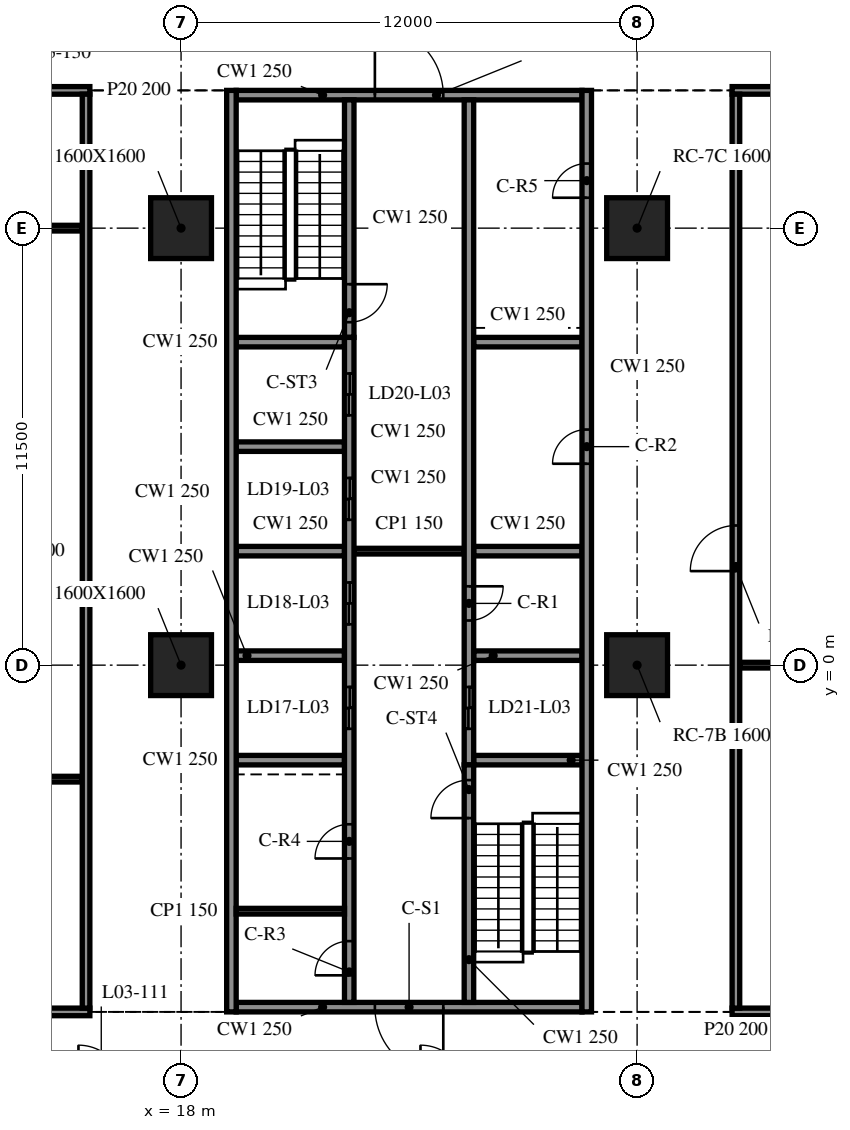
"""IFC4 building model, lengths in metres.
Left out: names, types, materials, properties, quantities, classifications, styles, units other than length and angle.
Written with IfcOpenShell. Run it as: python <this file> out.ifc"""

import sys

from ifc_helpers import new_model, si_unit, direction, frame, frame_2d, origin, origin_2d, place, context, subcontext, project, spatial, rectangle, extrude, element, fill, save


model = new_model("IFC4")
c1 = context("Model", 3, precision=1e-05, world=origin(), true_north=direction((0.0, 1.0)))
c2 = subcontext(c1, "Body", "Model", "MODEL_VIEW")
j1 = project(units=[si_unit("LENGTHUNIT", "METRE"), si_unit("PLANEANGLEUNIT", "RADIAN")], contexts=[c1])
p1 = place(None, origin())
s1 = spatial("IfcSite", under=j1, at=p1, CompositionType="ELEMENT")
p2 = place(p1, origin())
s2 = spatial("IfcBuilding", under=s1, at=p2, CompositionType="ELEMENT")
p3 = place(p2, frame((0.0, 0.0, 15.8)))
s3 = spatial("IfcBuildingStorey", under=s2, at=p3, CompositionType="ELEMENT", Elevation=15.8)
for number, where, z_axis, x_axis in (
    (1, (18.0, 0.0, -0.34), (0.0, 0.0, 1.0), (1.0, 0.0, 0.0)),
    (2, (18.0, 11.5, -0.34), (0.0, 0.0, 1.0), (1.0, 0.0, 0.0)),
    (3, (30.0, 0.0, -0.34), (0.0, 0.0, 1.0), (1.0, 0.0, 0.0)),
    (4, (30.0, 11.5, -0.34), (0.0, 0.0, 1.0), (1.0, 0.0, 0.0)),
):
    element("IfcColumn", number, at=place(p3, frame(where, z_axis=z_axis, x_axis=x_axis)), inside=s3, PredefinedType="COLUMN", context=c2, shape_type="SweptSolid", body=[
        extrude(rectangle(XDim=1.6, YDim=1.6, at=origin_2d()), origin(), (0.0, 0.0, 1.0), 4.3),
    ])
p4 = place(p3, frame((19.325, 15.125, 0.0), z_axis=(0.0, 0.0, 1.0), x_axis=(0.0, -1.0, 0.0)))
e5 = element("IfcWall", 5, at=p4, inside=s3, PredefinedType="SOLIDWALL", context=c2, shape_type="SweptSolid", body=[
    extrude(rectangle(XDim=24.25, YDim=0.25, at=frame_2d((12.125, 0.0))), origin(), (0.0, 0.0, 1.0), 3.96),
])
p5 = place(p3, frame((28.675, -9.125, 0.0), z_axis=(0.0, 0.0, 1.0), x_axis=(0.0, 1.0, 0.0)))
e6 = element("IfcWall", 6, at=p5, inside=s3, PredefinedType="SOLIDWALL", context=c2, shape_type="SweptSolid", body=[
    extrude(rectangle(XDim=24.25, YDim=0.25, at=frame_2d((12.125, 0.0))), origin(), (0.0, 0.0, 1.0), 3.96),
])
p6 = place(p5, frame((14.425, 0.0, 0.0)))
e7 = element("IfcOpeningElement", 7, at=p6, cuts=e6, PredefinedType="OPENING", context=c2, shape_type="SweptSolid", body=[
    extrude(rectangle(XDim=0.9, YDim=2.1, at=frame_2d((0.45, 1.05))), frame((0.0, 0.135, 0.0), z_axis=(0.0, -1.0, 0.0), x_axis=(1.0, 0.0, 0.0)), (0.0, 0.0, 1.0), 0.27),
])
p7 = place(p5, frame((21.425, 0.0, 0.0)))
e8 = element("IfcOpeningElement", 8, at=p7, cuts=e6, PredefinedType="OPENING", context=c2, shape_type="SweptSolid", body=[
    extrude(rectangle(XDim=0.9, YDim=2.1, at=frame_2d((0.45, 1.05))), frame((0.0, 0.135, 0.0), z_axis=(0.0, -1.0, 0.0), x_axis=(1.0, 0.0, 0.0)), (0.0, 0.0, 1.0), 0.27),
])
p8 = place(p3, frame((28.55, -9.0, 0.0), z_axis=(0.0, 0.0, 1.0), x_axis=(-1.0, 0.0, 0.0)))
e9 = element("IfcWall", 9, at=p8, inside=s3, PredefinedType="SOLIDWALL", context=c2, shape_type="SweptSolid", body=[
    extrude(rectangle(XDim=9.1, YDim=0.25, at=frame_2d((4.55, 0.0))), origin(), (0.0, 0.0, 1.0), 3.96),
])
p9 = place(p8, frame((3.65, 0.0, 0.0)))
e10 = element("IfcOpeningElement", 10, at=p9, cuts=e9, PredefinedType="OPENING", context=c2, shape_type="SweptSolid", body=[
    extrude(rectangle(XDim=1.8, YDim=2.1, at=frame_2d((0.9, 1.05))), frame((0.0, 0.135, 0.0), z_axis=(0.0, -1.0, 0.0), x_axis=(1.0, 0.0, 0.0)), (0.0, 0.0, 1.0), 0.27),
])
p10 = place(p3, frame((19.45, 15.0, 0.0), z_axis=(0.0, 0.0, 1.0), x_axis=(1.0, 0.0, 0.0)))
e11 = element("IfcWall", 11, at=p10, inside=s3, PredefinedType="SOLIDWALL", context=c2, shape_type="SweptSolid", body=[
    extrude(rectangle(XDim=9.1, YDim=0.25, at=frame_2d((4.55, 0.0))), origin(), (0.0, 0.0, 1.0), 3.96),
])
p11 = place(p10, frame((3.65, 0.0, 0.0)))
e12 = element("IfcOpeningElement", 12, at=p11, cuts=e11, PredefinedType="OPENING", context=c2, shape_type="SweptSolid", body=[
    extrude(rectangle(XDim=1.8, YDim=2.1, at=frame_2d((0.9, 1.05))), frame((0.0, 0.135, 0.0), z_axis=(0.0, -1.0, 0.0), x_axis=(1.0, 0.0, 0.0)), (0.0, 0.0, 1.0), 0.27),
])
p12 = place(p3, frame((22.425, -8.875, 0.0), z_axis=(0.0, 0.0, 1.0), x_axis=(0.0, 1.0, 0.0)))
e13 = element("IfcWall", 13, at=p12, inside=s3, PredefinedType="SOLIDWALL", context=c2, shape_type="SweptSolid", body=[
    extrude(rectangle(XDim=17.5, YDim=0.25, at=frame_2d((8.75, 0.0))), origin(), (0.0, 0.0, 1.0), 3.96),
])
p13 = place(p12, frame((7.2, 0.0, 0.0)))
e14 = element("IfcOpeningElement", 14, at=p13, cuts=e13, PredefinedType="OPENING", context=c2, shape_type="SweptSolid", body=[
    extrude(rectangle(XDim=1.1, YDim=2.1, at=frame_2d((0.55, 1.05))), frame((0.0, 0.135, 0.0), z_axis=(0.0, -1.0, 0.0), x_axis=(1.0, 0.0, 0.0)), (0.0, 0.0, 1.0), 0.27),
])
p14 = place(p12, frame((9.95, 0.0, 0.0)))
e15 = element("IfcOpeningElement", 15, at=p14, cuts=e13, PredefinedType="OPENING", context=c2, shape_type="SweptSolid", body=[
    extrude(rectangle(XDim=1.1, YDim=2.1, at=frame_2d((0.55, 1.05))), frame((0.0, 0.135, 0.0), z_axis=(0.0, -1.0, 0.0), x_axis=(1.0, 0.0, 0.0)), (0.0, 0.0, 1.0), 0.27),
])
p15 = place(p12, frame((12.7, 0.0, 0.0)))
e16 = element("IfcOpeningElement", 16, at=p15, cuts=e13, PredefinedType="OPENING", context=c2, shape_type="SweptSolid", body=[
    extrude(rectangle(XDim=1.1, YDim=2.1, at=frame_2d((0.55, 1.05))), frame((0.0, 0.135, 0.0), z_axis=(0.0, -1.0, 0.0), x_axis=(1.0, 0.0, 0.0)), (0.0, 0.0, 1.0), 0.27),
])
p16 = place(p12, frame((15.45, 0.0, 0.0)))
e17 = element("IfcOpeningElement", 17, at=p16, cuts=e13, PredefinedType="OPENING", context=c2, shape_type="SweptSolid", body=[
    extrude(rectangle(XDim=1.1, YDim=2.1, at=frame_2d((0.55, 1.05))), frame((0.0, 0.135, 0.0), z_axis=(0.0, -1.0, 0.0), x_axis=(1.0, 0.0, 0.0)), (0.0, 0.0, 1.0), 0.27),
])
p17 = place(p12, frame((0.712, 0.0, 0.0)))
e18 = element("IfcOpeningElement", 18, at=p17, cuts=e13, PredefinedType="OPENING", context=c2, shape_type="SweptSolid", body=[
    extrude(rectangle(XDim=0.9, YDim=2.1, at=frame_2d((0.45, 1.05))), frame((0.0, 0.135, 0.0), z_axis=(0.0, -1.0, 0.0), x_axis=(1.0, 0.0, 0.0)), (0.0, 0.0, 1.0), 0.27),
])
p18 = place(p12, frame((3.788, 0.0, 0.0)))
e19 = element("IfcOpeningElement", 19, at=p18, cuts=e13, PredefinedType="OPENING", context=c2, shape_type="SweptSolid", body=[
    extrude(rectangle(XDim=0.9, YDim=2.1, at=frame_2d((0.45, 1.05))), frame((0.0, 0.135, 0.0), z_axis=(0.0, -1.0, 0.0), x_axis=(1.0, 0.0, 0.0)), (0.0, 0.0, 1.0), 0.27),
])
p19 = place(p3, frame((22.425, 14.875, 0.0), z_axis=(0.0, 0.0, 1.0), x_axis=(0.0, -1.0, 0.0)))
e20 = element("IfcWall", 20, at=p19, inside=s3, PredefinedType="SOLIDWALL", context=c2, shape_type="SweptSolid", body=[
    extrude(rectangle(XDim=6.25, YDim=0.25, at=frame_2d((3.125, 0.0))), origin(), (0.0, 0.0, 1.0), 3.96),
])
p20 = place(p19, frame((4.85, 0.0, 0.0)))
e21 = element("IfcOpeningElement", 21, at=p20, cuts=e20, PredefinedType="OPENING", context=c2, shape_type="SweptSolid", body=[
    extrude(rectangle(XDim=1.0, YDim=2.1, at=frame_2d((0.5, 1.05))), frame((0.0, 0.135, 0.0), z_axis=(0.0, -1.0, 0.0), x_axis=(1.0, 0.0, 0.0)), (0.0, 0.0, 1.0), 0.27),
])
p21 = place(p3, frame((25.575, -8.875, 0.0), z_axis=(0.0, 0.0, 1.0), x_axis=(0.0, 1.0, 0.0)))
e22 = element("IfcWall", 22, at=p21, inside=s3, PredefinedType="SOLIDWALL", context=c2, shape_type="SweptSolid", body=[
    extrude(rectangle(XDim=6.25, YDim=0.25, at=frame_2d((3.125, 0.0))), origin(), (0.0, 0.0, 1.0), 3.96),
])
p22 = place(p21, frame((4.85, 0.0, 0.0)))
e23 = element("IfcOpeningElement", 23, at=p22, cuts=e22, PredefinedType="OPENING", context=c2, shape_type="SweptSolid", body=[
    extrude(rectangle(XDim=1.0, YDim=2.1, at=frame_2d((0.5, 1.05))), frame((0.0, 0.135, 0.0), z_axis=(0.0, -1.0, 0.0), x_axis=(1.0, 0.0, 0.0)), (0.0, 0.0, 1.0), 0.27),
])
p23 = place(p3, frame((25.575, 14.875, 0.0), z_axis=(0.0, 0.0, 1.0), x_axis=(0.0, -1.0, 0.0)))
e24 = element("IfcWall", 24, at=p23, inside=s3, PredefinedType="SOLIDWALL", context=c2, shape_type="SweptSolid", body=[
    extrude(rectangle(XDim=17.5, YDim=0.25, at=frame_2d((8.75, 0.0))), origin(), (0.0, 0.0, 1.0), 3.96),
])
p24 = place(p23, frame((15.45, 0.0, 0.0)))
e25 = element("IfcOpeningElement", 25, at=p24, cuts=e24, PredefinedType="OPENING", context=c2, shape_type="SweptSolid", body=[
    extrude(rectangle(XDim=1.1, YDim=2.1, at=frame_2d((0.55, 1.05))), frame((0.0, 0.135, 0.0), z_axis=(0.0, -1.0, 0.0), x_axis=(1.0, 0.0, 0.0)), (0.0, 0.0, 1.0), 0.27),
])
p25 = place(p23, frame((12.8, 0.0, 0.0)))
e26 = element("IfcOpeningElement", 26, at=p25, cuts=e24, PredefinedType="OPENING", context=c2, shape_type="SweptSolid", body=[
    extrude(rectangle(XDim=0.9, YDim=2.1, at=frame_2d((0.45, 1.05))), frame((0.0, 0.135, 0.0), z_axis=(0.0, -1.0, 0.0), x_axis=(1.0, 0.0, 0.0)), (0.0, 0.0, 1.0), 0.27),
])
for number, where, z_axis, x_axis in (
    (27, (19.45, -2.5, 0.0), (0.0, 0.0, 1.0), (1.0, 0.0, 0.0)),
    (28, (19.45, 0.25, 0.0), (0.0, 0.0, 1.0), (1.0, 0.0, 0.0)),
    (29, (19.45, 3.0, 0.0), (0.0, 0.0, 1.0), (1.0, 0.0, 0.0)),
    (30, (19.45, 5.75, 0.0), (0.0, 0.0, 1.0), (1.0, 0.0, 0.0)),
    (31, (19.45, 8.5, 0.0), (0.0, 0.0, 1.0), (1.0, 0.0, 0.0)),
    (32, (25.7, -2.5, 0.0), (0.0, 0.0, 1.0), (1.0, 0.0, 0.0)),
    (33, (25.7, 0.25, 0.0), (0.0, 0.0, 1.0), (1.0, 0.0, 0.0)),
    (34, (25.7, 3.0, 0.0), (0.0, 0.0, 1.0), (1.0, 0.0, 0.0)),
    (35, (25.7, 8.5, 0.0), (0.0, 0.0, 1.0), (1.0, 0.0, 0.0)),
):
    element("IfcWall", number, at=place(p3, frame(where, z_axis=z_axis, x_axis=x_axis)), inside=s3, PredefinedType="SOLIDWALL", context=c2, shape_type="SweptSolid", body=[
        extrude(rectangle(XDim=2.85, YDim=0.25, at=frame_2d((1.425, 0.0))), origin(), (0.0, 0.0, 1.0), 3.96),
    ])
p26 = place(p3, frame((22.55, 3.0, 0.0), z_axis=(0.0, 0.0, 1.0), x_axis=(1.0, 0.0, 0.0)))
e36 = element("IfcWall", 36, at=p26, inside=s3, PredefinedType="PARTITIONING", context=c2, shape_type="SweptSolid", body=[
    extrude(rectangle(XDim=2.9, YDim=0.15, at=frame_2d((1.45, 0.0))), origin(), (0.0, 0.0, 1.0), 3.96),
])
p27 = place(p3, frame((19.45, -6.475, 0.0), z_axis=(0.0, 0.0, 1.0), x_axis=(1.0, 0.0, 0.0)))
e37 = element("IfcWall", 37, at=p27, inside=s3, PredefinedType="PARTITIONING", context=c2, shape_type="SweptSolid", body=[
    extrude(rectangle(XDim=2.85, YDim=0.15, at=frame_2d((1.425, 0.0))), origin(), (0.0, 0.0, 1.0), 3.96),
])
p28 = place(p3, frame((8.3, -9.125, 0.0), z_axis=(0.0, 0.0, 1.0), x_axis=(1.0, 0.0, 0.0)))
e38 = element("IfcWall", 38, at=p28, inside=s3, PredefinedType="PARTITIONING", context=c2, shape_type="SweptSolid", body=[
    extrude(rectangle(XDim=7.3, YDim=0.2, at=frame_2d((3.65, 0.0))), origin(), (0.0, 0.0, 1.0), 3.96),
])
p29 = place(p28, frame((3.1, 0.0, 0.0)))
e39 = element("IfcOpeningElement", 39, at=p29, cuts=e38, PredefinedType="OPENING", context=c2, shape_type="SweptSolid", body=[
    extrude(rectangle(XDim=1.0, YDim=2.1, at=frame_2d((0.5, 1.05))), frame((0.0, 0.11, 0.0), z_axis=(0.0, -1.0, 0.0), x_axis=(1.0, 0.0, 0.0)), (0.0, 0.0, 1.0), 0.22),
])
p30 = place(p3, frame((32.5, -9.125, 0.0), z_axis=(0.0, 0.0, 1.0), x_axis=(1.0, 0.0, 0.0)))
e40 = element("IfcWall", 40, at=p30, inside=s3, PredefinedType="PARTITIONING", context=c2, shape_type="SweptSolid", body=[
    extrude(rectangle(XDim=13.45, YDim=0.2, at=frame_2d((6.725, 0.0))), origin(), (0.0, 0.0, 1.0), 3.96),
])
p31 = place(p30, frame((5.1, 0.0, 0.0)))
e41 = element("IfcOpeningElement", 41, at=p31, cuts=e40, PredefinedType="OPENING", context=c2, shape_type="SweptSolid", body=[
    extrude(rectangle(XDim=1.2, YDim=2.1, at=frame_2d((0.6, 1.05))), frame((0.0, 0.11, 0.0), z_axis=(0.0, -1.0, 0.0), x_axis=(1.0, 0.0, 0.0)), (0.0, 0.0, 1.0), 0.22),
])
p32 = place(p30, frame((6.9, 0.0, 0.0)))
e42 = element("IfcOpeningElement", 42, at=p32, cuts=e40, PredefinedType="OPENING", context=c2, shape_type="SweptSolid", body=[
    extrude(rectangle(XDim=1.2, YDim=2.1, at=frame_2d((0.6, 1.05))), frame((0.0, 0.11, 0.0), z_axis=(0.0, -1.0, 0.0), x_axis=(1.0, 0.0, 0.0)), (0.0, 0.0, 1.0), 0.22),
])
p33 = place(p3, frame((8.5, -3.0, 0.0), z_axis=(0.0, 0.0, 1.0), x_axis=(1.0, 0.0, 0.0)))
e43 = element("IfcWall", 43, at=p33, inside=s3, PredefinedType="PARTITIONING", context=c2, shape_type="SweptSolid", body=[
    extrude(rectangle(XDim=6.9, YDim=0.15, at=frame_2d((3.45, 0.0))), origin(), (0.0, 0.0, 1.0), 3.96),
])
p34 = place(p3, frame((32.7, 0.0, 0.0), z_axis=(0.0, 0.0, 1.0), x_axis=(1.0, 0.0, 0.0)))
e44 = element("IfcWall", 44, at=p34, inside=s3, PredefinedType="PARTITIONING", context=c2, shape_type="SweptSolid", body=[
    extrude(rectangle(XDim=8.5, YDim=0.15, at=frame_2d((4.25, 0.0))), origin(), (0.0, 0.0, 1.0), 3.96),
])
p35 = place(p3, frame((8.5, 11.5, 0.0), z_axis=(0.0, 0.0, 1.0), x_axis=(1.0, 0.0, 0.0)))
e45 = element("IfcWall", 45, at=p35, inside=s3, PredefinedType="PARTITIONING", context=c2, shape_type="SweptSolid", body=[
    extrude(rectangle(XDim=6.9, YDim=0.15, at=frame_2d((3.45, 0.0))), origin(), (0.0, 0.0, 1.0), 3.96),
])
p36 = place(p3, frame((8.3, 15.125, 0.0), z_axis=(0.0, 0.0, 1.0), x_axis=(1.0, 0.0, 0.0)))
e46 = element("IfcWall", 46, at=p36, inside=s3, PredefinedType="PARTITIONING", context=c2, shape_type="SweptSolid", body=[
    extrude(rectangle(XDim=7.3, YDim=0.2, at=frame_2d((3.65, 0.0))), origin(), (0.0, 0.0, 1.0), 3.96),
])
p37 = place(p36, frame((3.1, 0.0, 0.0)))
e47 = element("IfcOpeningElement", 47, at=p37, cuts=e46, PredefinedType="OPENING", context=c2, shape_type="SweptSolid", body=[
    extrude(rectangle(XDim=1.0, YDim=2.1, at=frame_2d((0.5, 1.05))), frame((0.0, 0.11, 0.0), z_axis=(0.0, -1.0, 0.0), x_axis=(1.0, 0.0, 0.0)), (0.0, 0.0, 1.0), 0.22),
])
p38 = place(p3, frame((32.5, 15.125, 0.0), z_axis=(0.0, 0.0, 1.0), x_axis=(1.0, 0.0, 0.0)))
e48 = element("IfcWall", 48, at=p38, inside=s3, PredefinedType="PARTITIONING", context=c2, shape_type="SweptSolid", body=[
    extrude(rectangle(XDim=13.45, YDim=0.2, at=frame_2d((6.725, 0.0))), origin(), (0.0, 0.0, 1.0), 3.96),
])
p39 = place(p3, frame((15.5, -9.025, 0.0), z_axis=(0.0, 0.0, 1.0), x_axis=(0.0, 1.0, 0.0)))
e49 = element("IfcWall", 49, at=p39, inside=s3, PredefinedType="PARTITIONING", context=c2, shape_type="SweptSolid", body=[
    extrude(rectangle(XDim=24.05, YDim=0.2, at=frame_2d((12.025, 0.0))), origin(), (0.0, 0.0, 1.0), 3.96),
])
p40 = place(p3, frame((32.6, -9.025, 0.0), z_axis=(0.0, 0.0, 1.0), x_axis=(0.0, 1.0, 0.0)))
e50 = element("IfcWall", 50, at=p40, inside=s3, PredefinedType="PARTITIONING", context=c2, shape_type="SweptSolid", body=[
    extrude(rectangle(XDim=24.05, YDim=0.2, at=frame_2d((12.025, 0.0))), origin(), (0.0, 0.0, 1.0), 3.96),
])
p41 = place(p40, frame((11.5, 0.0, 0.0)))
e51 = element("IfcOpeningElement", 51, at=p41, cuts=e50, PredefinedType="OPENING", context=c2, shape_type="SweptSolid", body=[
    extrude(rectangle(XDim=1.2, YDim=2.1, at=frame_2d((0.6, 1.05))), frame((0.0, 0.11, 0.0), z_axis=(0.0, -1.0, 0.0), x_axis=(1.0, 0.0, 0.0)), (0.0, 0.0, 1.0), 0.22),
])
p42 = place(p9, origin())
e52 = element("IfcDoor", 52, at=p42, inside=s3, OperationType="DOUBLE_DOOR_SINGLE_SWING", PredefinedType="DOOR", context=c2, shape_type="SweptSolid", body=[
    extrude(rectangle(XDim=1.8, YDim=2.1, at=frame_2d((0.9, 1.05))), frame((0.0, 0.025, 0.0), z_axis=(0.0, -1.0, 0.0), x_axis=(1.0, 0.0, 0.0)), (0.0, 0.0, 1.0), 0.05),
])
fill(e10, e52)
p43 = place(p11, origin())
e53 = element("IfcDoor", 53, at=p43, inside=s3, OperationType="DOUBLE_DOOR_SINGLE_SWING", PredefinedType="DOOR", context=c2, shape_type="SweptSolid", body=[
    extrude(rectangle(XDim=1.8, YDim=2.1, at=frame_2d((0.9, 1.05))), frame((0.0, 0.025, 0.0), z_axis=(0.0, -1.0, 0.0), x_axis=(1.0, 0.0, 0.0)), (0.0, 0.0, 1.0), 0.05),
])
fill(e12, e53)
p44 = place(p24, origin())
e54 = element("IfcDoor", 54, at=p44, inside=s3, OperationType="DOUBLE_DOOR_SLIDING", PredefinedType="DOOR", context=c2, shape_type="SweptSolid", body=[
    extrude(rectangle(XDim=1.1, YDim=2.1, at=frame_2d((0.55, 1.05))), frame((0.0, 0.025, 0.0), z_axis=(0.0, -1.0, 0.0), x_axis=(1.0, 0.0, 0.0)), (0.0, 0.0, 1.0), 0.05),
])
fill(e25, e54)
p45 = place(p13, origin())
e55 = element("IfcDoor", 55, at=p45, inside=s3, OperationType="DOUBLE_DOOR_SLIDING", PredefinedType="DOOR", context=c2, shape_type="SweptSolid", body=[
    extrude(rectangle(XDim=1.1, YDim=2.1, at=frame_2d((0.55, 1.05))), frame((0.0, 0.025, 0.0), z_axis=(0.0, -1.0, 0.0), x_axis=(1.0, 0.0, 0.0)), (0.0, 0.0, 1.0), 0.05),
])
fill(e14, e55)
p46 = place(p14, origin())
e56 = element("IfcDoor", 56, at=p46, inside=s3, OperationType="DOUBLE_DOOR_SLIDING", PredefinedType="DOOR", context=c2, shape_type="SweptSolid", body=[
    extrude(rectangle(XDim=1.1, YDim=2.1, at=frame_2d((0.55, 1.05))), frame((0.0, 0.025, 0.0), z_axis=(0.0, -1.0, 0.0), x_axis=(1.0, 0.0, 0.0)), (0.0, 0.0, 1.0), 0.05),
])
fill(e15, e56)
p47 = place(p15, origin())
e57 = element("IfcDoor", 57, at=p47, inside=s3, OperationType="DOUBLE_DOOR_SLIDING", PredefinedType="DOOR", context=c2, shape_type="SweptSolid", body=[
    extrude(rectangle(XDim=1.1, YDim=2.1, at=frame_2d((0.55, 1.05))), frame((0.0, 0.025, 0.0), z_axis=(0.0, -1.0, 0.0), x_axis=(1.0, 0.0, 0.0)), (0.0, 0.0, 1.0), 0.05),
])
fill(e16, e57)
p48 = place(p16, origin())
e58 = element("IfcDoor", 58, at=p48, inside=s3, OperationType="DOUBLE_DOOR_SLIDING", PredefinedType="DOOR", context=c2, shape_type="SweptSolid", body=[
    extrude(rectangle(XDim=1.1, YDim=2.1, at=frame_2d((0.55, 1.05))), frame((0.0, 0.025, 0.0), z_axis=(0.0, -1.0, 0.0), x_axis=(1.0, 0.0, 0.0)), (0.0, 0.0, 1.0), 0.05),
])
fill(e17, e58)
p49 = place(p25, origin())
e59 = element("IfcDoor", 59, at=p49, inside=s3, OperationType="SINGLE_SWING_LEFT", PredefinedType="DOOR", context=c2, shape_type="SweptSolid", body=[
    extrude(rectangle(XDim=0.9, YDim=2.1, at=frame_2d((0.45, 1.05))), frame((0.0, 0.025, 0.0), z_axis=(0.0, -1.0, 0.0), x_axis=(1.0, 0.0, 0.0)), (0.0, 0.0, 1.0), 0.05),
])
fill(e26, e59)
p50 = place(p6, origin())
e60 = element("IfcDoor", 60, at=p50, inside=s3, OperationType="SINGLE_SWING_RIGHT", PredefinedType="DOOR", context=c2, shape_type="SweptSolid", body=[
    extrude(rectangle(XDim=0.9, YDim=2.1, at=frame_2d((0.45, 1.05))), frame((0.0, 0.025, 0.0), z_axis=(0.0, -1.0, 0.0), x_axis=(1.0, 0.0, 0.0)), (0.0, 0.0, 1.0), 0.05),
])
fill(e7, e60)
p51 = place(p17, origin())
e61 = element("IfcDoor", 61, at=p51, inside=s3, OperationType="SINGLE_SWING_LEFT", PredefinedType="DOOR", context=c2, shape_type="SweptSolid", body=[
    extrude(rectangle(XDim=0.9, YDim=2.1, at=frame_2d((0.45, 1.05))), frame((0.0, 0.025, 0.0), z_axis=(0.0, -1.0, 0.0), x_axis=(1.0, 0.0, 0.0)), (0.0, 0.0, 1.0), 0.05),
])
fill(e18, e61)
p52 = place(p18, origin())
e62 = element("IfcDoor", 62, at=p52, inside=s3, OperationType="SINGLE_SWING_RIGHT", PredefinedType="DOOR", context=c2, shape_type="SweptSolid", body=[
    extrude(rectangle(XDim=0.9, YDim=2.1, at=frame_2d((0.45, 1.05))), frame((0.0, 0.025, 0.0), z_axis=(0.0, -1.0, 0.0), x_axis=(1.0, 0.0, 0.0)), (0.0, 0.0, 1.0), 0.05),
])
fill(e19, e62)
p53 = place(p7, origin())
e63 = element("IfcDoor", 63, at=p53, inside=s3, OperationType="SINGLE_SWING_LEFT", PredefinedType="DOOR", context=c2, shape_type="SweptSolid", body=[
    extrude(rectangle(XDim=0.9, YDim=2.1, at=frame_2d((0.45, 1.05))), frame((0.0, 0.025, 0.0), z_axis=(0.0, -1.0, 0.0), x_axis=(1.0, 0.0, 0.0)), (0.0, 0.0, 1.0), 0.05),
])
fill(e8, e63)
p54 = place(p20, origin())
e64 = element("IfcDoor", 64, at=p54, inside=s3, OperationType="SINGLE_SWING_RIGHT", PredefinedType="DOOR", context=c2, shape_type="SweptSolid", body=[
    extrude(rectangle(XDim=1.0, YDim=2.1, at=frame_2d((0.5, 1.05))), frame((0.0, 0.025, 0.0), z_axis=(0.0, -1.0, 0.0), x_axis=(1.0, 0.0, 0.0)), (0.0, 0.0, 1.0), 0.05),
])
fill(e21, e64)
p55 = place(p22, origin())
e65 = element("IfcDoor", 65, at=p55, inside=s3, OperationType="SINGLE_SWING_LEFT", PredefinedType="DOOR", context=c2, shape_type="SweptSolid", body=[
    extrude(rectangle(XDim=1.0, YDim=2.1, at=frame_2d((0.5, 1.05))), frame((0.0, 0.025, 0.0), z_axis=(0.0, -1.0, 0.0), x_axis=(1.0, 0.0, 0.0)), (0.0, 0.0, 1.0), 0.05),
])
fill(e23, e65)
p56 = place(p41, origin())
e66 = element("IfcDoor", 66, at=p56, inside=s3, OperationType="SINGLE_SWING_LEFT", PredefinedType="DOOR", context=c2, shape_type="SweptSolid", body=[
    extrude(rectangle(XDim=1.2, YDim=2.1, at=frame_2d((0.6, 1.05))), frame((0.0, 0.025, 0.0), z_axis=(0.0, -1.0, 0.0), x_axis=(1.0, 0.0, 0.0)), (0.0, 0.0, 1.0), 0.05),
])
fill(e51, e66)
save(model, sys.argv[1])
